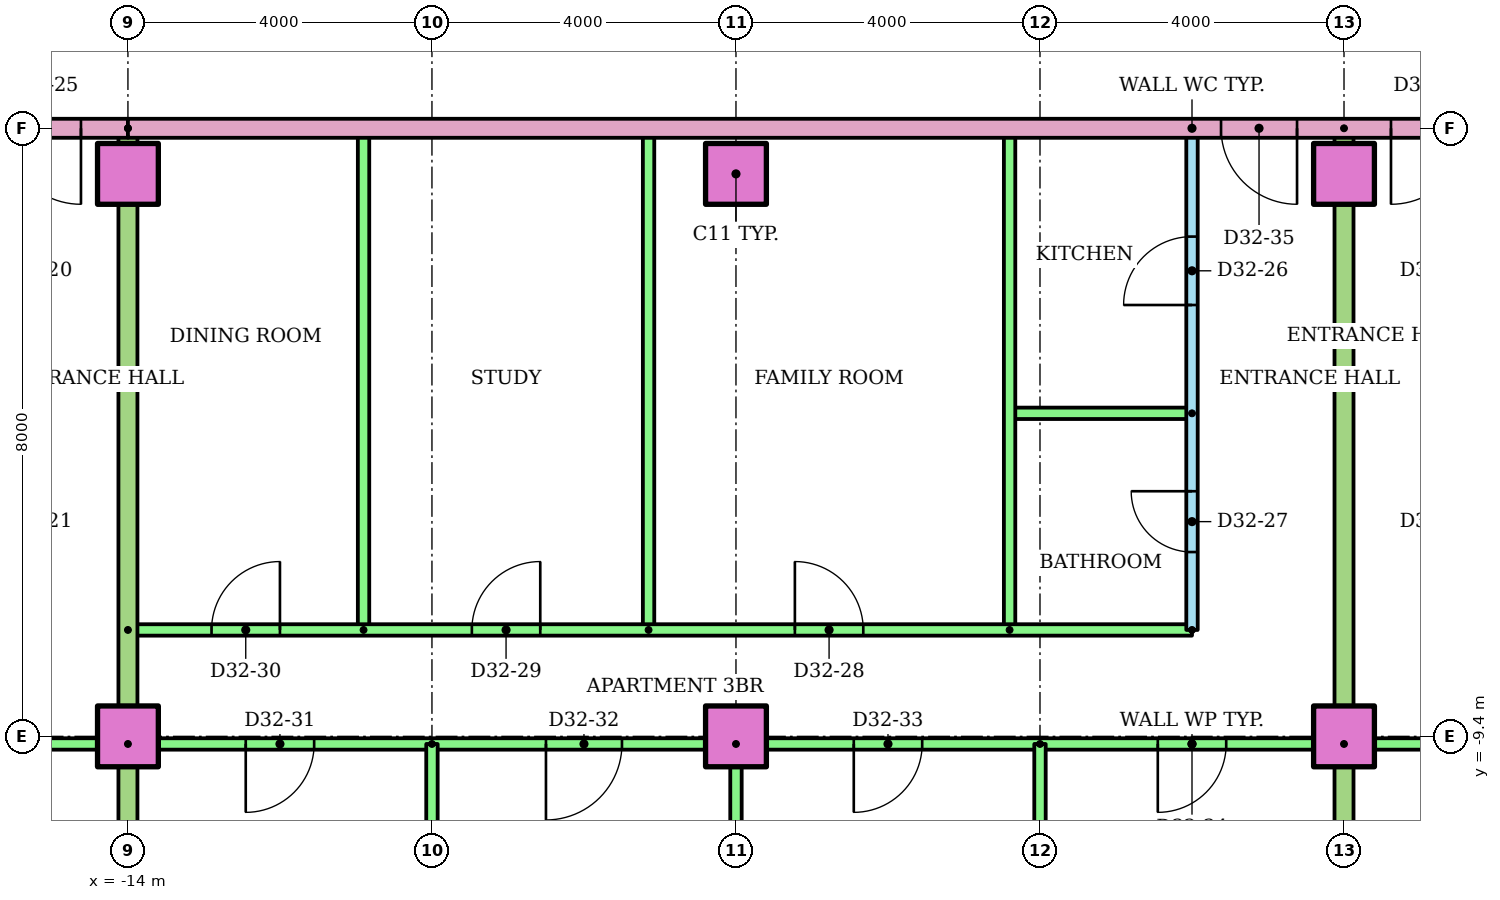
"""IFC4 building model, lengths in metres.
Left out: names, types, materials, properties, quantities, classifications, styles, units other than length and angle.
Written with IfcOpenShell. Run it as: python <this file> out.ifc"""

import sys

from ifc_helpers import new_model, si_unit, direction, frame, frame_2d, origin, origin_2d, place, context, subcontext, project, spatial, rectangle, extrude, element, fill, save


model = new_model("IFC4")
c1 = context("Model", 3, precision=1e-05, world=origin(), true_north=direction((0.0, 1.0)))
c2 = subcontext(c1, "Body", "Model", "MODEL_VIEW")
j1 = project(units=[si_unit("LENGTHUNIT", "METRE"), si_unit("PLANEANGLEUNIT", "RADIAN")], contexts=[c1])
p1 = place(None, origin())
s1 = spatial("IfcSite", under=j1, at=p1, CompositionType="ELEMENT")
p2 = place(p1, origin())
s2 = spatial("IfcBuilding", under=s1, at=p2, CompositionType="ELEMENT")
p3 = place(p2, frame((0.0, 0.0, 126.2)))
s3 = spatial("IfcBuildingStorey", under=s2, at=p3, CompositionType="ELEMENT", Elevation=126.2)
for number, where in (
    (1, (-14.0, -9.4, 0.0)),
    (2, (-6.0, -9.4, 0.0)),
    (3, (2.0, -9.4, 0.0)),
    (4, (-14.0, -2.0, 0.0)),
    (5, (-6.0, -2.0, 0.0)),
    (6, (2.0, -2.0, 0.0)),
):
    element("IfcColumn", number, at=place(p3, frame(where)), inside=s3, PredefinedType="COLUMN", context=c2, shape_type="SweptSolid", body=[
        extrude(rectangle(XDim=0.8, YDim=0.8, at=origin_2d()), origin(), (0.0, 0.0, 1.0), 3.2),
    ])
p4 = place(p3, frame((-14.0, -9.5, 0.0), z_axis=(0.0, 0.0, 1.0), x_axis=(-1.0, 0.0, 0.0)))
e7 = element("IfcWall", 7, at=p4, inside=s3, PredefinedType="PARTITIONING", context=c2, shape_type="SweptSolid", body=[
    extrude(rectangle(XDim=8.0, YDim=0.15, at=frame_2d((4.0, 0.0))), origin(), (0.0, 0.0, 1.0), 2.4),
])
p5 = place(p4, frame((5.5, 0.0, 0.0)))
e8 = element("IfcOpeningElement", 8, at=p5, cuts=e7, PredefinedType="OPENING", context=c2, shape_type="SweptSolid", body=[
    extrude(rectangle(XDim=1.0, YDim=2.1, at=frame_2d((0.5, 1.05))), frame((0.0, 0.085, 0.0), z_axis=(0.0, -1.0, 0.0), x_axis=(1.0, 0.0, 0.0)), (0.0, 0.0, 1.0), 0.17),
])
p6 = place(p4, frame((1.5, 0.0, 0.0)))
e9 = element("IfcOpeningElement", 9, at=p6, cuts=e7, PredefinedType="OPENING", context=c2, shape_type="SweptSolid", body=[
    extrude(rectangle(XDim=1.0, YDim=2.1, at=frame_2d((0.5, 1.05))), frame((0.0, 0.085, 0.0), z_axis=(0.0, -1.0, 0.0), x_axis=(1.0, 0.0, 0.0)), (0.0, 0.0, 1.0), 0.17),
])
p7 = place(p3, frame((0.0, -8.0, 0.0), z_axis=(0.0, 0.0, 1.0), x_axis=(0.0, 1.0, 0.0)))
e10 = element("IfcWall", 10, at=p7, inside=s3, PredefinedType="PARTITIONING", context=c2, shape_type="SweptSolid", body=[
    extrude(rectangle(XDim=6.6, YDim=0.15, at=frame_2d((3.3, 0.0))), origin(), (0.0, 0.0, 1.0), 2.4),
])
p8 = place(p7, frame((4.275, 0.0, 0.0)))
e11 = element("IfcOpeningElement", 11, at=p8, cuts=e10, PredefinedType="OPENING", context=c2, shape_type="SweptSolid", body=[
    extrude(rectangle(XDim=0.9, YDim=2.1, at=frame_2d((0.45, 1.05))), frame((0.0, 0.085, 0.0), z_axis=(0.0, -1.0, 0.0), x_axis=(1.0, 0.0, 0.0)), (0.0, 0.0, 1.0), 0.17),
])
p9 = place(p7, frame((1.025, 0.0, 0.0)))
e12 = element("IfcOpeningElement", 12, at=p9, cuts=e10, PredefinedType="OPENING", context=c2, shape_type="SweptSolid", body=[
    extrude(rectangle(XDim=0.8, YDim=2.1, at=frame_2d((0.4, 1.05))), frame((0.0, 0.085, 0.0), z_axis=(0.0, -1.0, 0.0), x_axis=(1.0, 0.0, 0.0)), (0.0, 0.0, 1.0), 0.17),
])
p10 = place(p3, frame((0.0, -5.15, 0.0), z_axis=(0.0, 0.0, 1.0), x_axis=(-1.0, 0.0, 0.0)))
e13 = element("IfcWall", 13, at=p10, inside=s3, PredefinedType="PARTITIONING", context=c2, shape_type="SweptSolid", body=[
    extrude(rectangle(XDim=2.4, YDim=0.15, at=frame_2d((1.2, 0.0))), origin(), (0.0, 0.0, 1.0), 2.4),
])
for number, where, z_axis, x_axis in (
    (14, (-2.4, -8.0, 0.0), (0.0, 0.0, 1.0), (0.0, 1.0, 0.0)),
    (15, (-7.15, -8.0, 0.0), (0.0, 0.0, 1.0), (0.0, 1.0, 0.0)),
    (16, (-10.9, -8.0, 0.0), (0.0, 0.0, 1.0), (0.0, 1.0, 0.0)),
):
    element("IfcWall", number, at=place(p3, frame(where, z_axis=z_axis, x_axis=x_axis)), inside=s3, PredefinedType="PARTITIONING", context=c2, shape_type="SweptSolid", body=[
        extrude(rectangle(XDim=6.6, YDim=0.15, at=frame_2d((3.3, 0.0))), origin(), (0.0, 0.0, 1.0), 2.4),
    ])
p11 = place(p3, frame((-14.0, -8.0, 0.0)))
e17 = element("IfcWall", 17, at=p11, inside=s3, PredefinedType="PARTITIONING", context=c2, shape_type="SweptSolid", body=[
    extrude(rectangle(XDim=14.0, YDim=0.15, at=frame_2d((7.0, 0.0))), origin(), (0.0, 0.0, 1.0), 2.4),
])
p12 = place(p11, frame((8.775, 0.0, 0.0)))
e18 = element("IfcOpeningElement", 18, at=p12, cuts=e17, PredefinedType="OPENING", context=c2, shape_type="SweptSolid", body=[
    extrude(rectangle(XDim=0.9, YDim=2.1, at=frame_2d((0.45, 1.05))), frame((0.0, 0.085, 0.0), z_axis=(0.0, -1.0, 0.0), x_axis=(1.0, 0.0, 0.0)), (0.0, 0.0, 1.0), 0.17),
])
p13 = place(p11, frame((4.525, 0.0, 0.0)))
e19 = element("IfcOpeningElement", 19, at=p13, cuts=e17, PredefinedType="OPENING", context=c2, shape_type="SweptSolid", body=[
    extrude(rectangle(XDim=0.9, YDim=2.1, at=frame_2d((0.45, 1.05))), frame((0.0, 0.085, 0.0), z_axis=(0.0, -1.0, 0.0), x_axis=(1.0, 0.0, 0.0)), (0.0, 0.0, 1.0), 0.17),
])
p14 = place(p11, frame((1.1, 0.0, 0.0)))
e20 = element("IfcOpeningElement", 20, at=p14, cuts=e17, PredefinedType="OPENING", context=c2, shape_type="SweptSolid", body=[
    extrude(rectangle(XDim=0.9, YDim=2.1, at=frame_2d((0.45, 1.05))), frame((0.0, 0.085, 0.0), z_axis=(0.0, -1.0, 0.0), x_axis=(1.0, 0.0, 0.0)), (0.0, 0.0, 1.0), 0.17),
])
p15 = place(p3, frame((2.0, -9.5, 0.0), z_axis=(0.0, 0.0, 1.0), x_axis=(-1.0, 0.0, 0.0)))
e21 = element("IfcWall", 21, at=p15, inside=s3, PredefinedType="PARTITIONING", context=c2, shape_type="SweptSolid", body=[
    extrude(rectangle(XDim=16.0, YDim=0.15, at=frame_2d((8.0, 0.0))), origin(), (0.0, 0.0, 1.0), 2.4),
])
p16 = place(p15, frame((13.55, 0.0, 0.0)))
e22 = element("IfcOpeningElement", 22, at=p16, cuts=e21, PredefinedType="OPENING", context=c2, shape_type="SweptSolid", body=[
    extrude(rectangle(XDim=0.9, YDim=2.1, at=frame_2d((0.45, 1.05))), frame((0.0, 0.085, 0.0), z_axis=(0.0, -1.0, 0.0), x_axis=(1.0, 0.0, 0.0)), (0.0, 0.0, 1.0), 0.17),
])
p17 = place(p15, frame((9.5, 0.0, 0.0)))
e23 = element("IfcOpeningElement", 23, at=p17, cuts=e21, PredefinedType="OPENING", context=c2, shape_type="SweptSolid", body=[
    extrude(rectangle(XDim=1.0, YDim=2.1, at=frame_2d((0.5, 1.05))), frame((0.0, 0.085, 0.0), z_axis=(0.0, -1.0, 0.0), x_axis=(1.0, 0.0, 0.0)), (0.0, 0.0, 1.0), 0.17),
])
p18 = place(p15, frame((5.55, 0.0, 0.0)))
e24 = element("IfcOpeningElement", 24, at=p18, cuts=e21, PredefinedType="OPENING", context=c2, shape_type="SweptSolid", body=[
    extrude(rectangle(XDim=0.9, YDim=2.1, at=frame_2d((0.45, 1.05))), frame((0.0, 0.085, 0.0), z_axis=(0.0, -1.0, 0.0), x_axis=(1.0, 0.0, 0.0)), (0.0, 0.0, 1.0), 0.17),
])
p19 = place(p15, frame((1.55, 0.0, 0.0)))
e25 = element("IfcOpeningElement", 25, at=p19, cuts=e21, PredefinedType="OPENING", context=c2, shape_type="SweptSolid", body=[
    extrude(rectangle(XDim=0.9, YDim=2.1, at=frame_2d((0.45, 1.05))), frame((0.0, 0.085, 0.0), z_axis=(0.0, -1.0, 0.0), x_axis=(1.0, 0.0, 0.0)), (0.0, 0.0, 1.0), 0.17),
])
p20 = place(p3, frame((-10.0, -9.5, 0.0), z_axis=(0.0, 0.0, 1.0), x_axis=(0.0, -1.0, 0.0)))
e26 = element("IfcWall", 26, at=p20, inside=s3, PredefinedType="PARTITIONING", context=c2, shape_type="SweptSolid", body=[
    extrude(rectangle(XDim=6.821, YDim=0.15, at=frame_2d((3.411, 0.0))), origin(), (0.0, 0.0, 1.0), 2.4),
])
p21 = place(p3, frame((-6.0, -9.5, 0.0), z_axis=(0.0, 0.0, 1.0), x_axis=(0.0, -1.0, 0.0)))
e27 = element("IfcWall", 27, at=p21, inside=s3, PredefinedType="PARTITIONING", context=c2, shape_type="SweptSolid", body=[
    extrude(rectangle(XDim=6.81, YDim=0.15, at=frame_2d((3.405, 0.0))), origin(), (0.0, 0.0, 1.0), 2.4),
])
p22 = place(p3, frame((-2.0, -9.5, 0.0), z_axis=(0.0, 0.0, 1.0), x_axis=(0.0, -1.0, 0.0)))
e28 = element("IfcWall", 28, at=p22, inside=s3, PredefinedType="PARTITIONING", context=c2, shape_type="SweptSolid", body=[
    extrude(rectangle(XDim=6.821, YDim=0.15, at=frame_2d((3.411, 0.0))), origin(), (0.0, 0.0, 1.0), 2.4),
])
p23 = place(p3, frame((-14.0, -1.4, 0.0), z_axis=(0.0, 0.0, 1.0), x_axis=(0.0, -1.0, 0.0)))
e29 = element("IfcWall", 29, at=p23, inside=s3, PredefinedType="PARTITIONING", context=c2, shape_type="SweptSolid", body=[
    extrude(rectangle(XDim=14.91, YDim=0.25, at=frame_2d((7.455, 0.0))), origin(), (0.0, 0.0, 1.0), 2.4),
])
p24 = place(p3, frame((18.0, -9.5, 0.0), z_axis=(0.0, 0.0, 1.0), x_axis=(-1.0, 0.0, 0.0)))
e30 = element("IfcWall", 30, at=p24, inside=s3, PredefinedType="PARTITIONING", context=c2, shape_type="SweptSolid", body=[
    extrude(rectangle(XDim=16.0, YDim=0.15, at=frame_2d((8.0, 0.0))), origin(), (0.0, 0.0, 1.0), 2.4),
])
p25 = place(p24, frame((13.55, 0.0, 0.0)))
e31 = element("IfcOpeningElement", 31, at=p25, cuts=e30, PredefinedType="OPENING", context=c2, shape_type="SweptSolid", body=[
    extrude(rectangle(XDim=0.9, YDim=2.1, at=frame_2d((0.45, 1.05))), frame((0.0, 0.085, 0.0), z_axis=(0.0, -1.0, 0.0), x_axis=(1.0, 0.0, 0.0)), (0.0, 0.0, 1.0), 0.17),
])
p26 = place(p24, frame((9.55, 0.0, 0.0)))
e32 = element("IfcOpeningElement", 32, at=p26, cuts=e30, PredefinedType="OPENING", context=c2, shape_type="SweptSolid", body=[
    extrude(rectangle(XDim=0.9, YDim=2.1, at=frame_2d((0.45, 1.05))), frame((0.0, 0.085, 0.0), z_axis=(0.0, -1.0, 0.0), x_axis=(1.0, 0.0, 0.0)), (0.0, 0.0, 1.0), 0.17),
])
p27 = place(p24, frame((5.55, 0.0, 0.0)))
e33 = element("IfcOpeningElement", 33, at=p27, cuts=e30, PredefinedType="OPENING", context=c2, shape_type="SweptSolid", body=[
    extrude(rectangle(XDim=0.9, YDim=2.1, at=frame_2d((0.45, 1.05))), frame((0.0, 0.085, 0.0), z_axis=(0.0, -1.0, 0.0), x_axis=(1.0, 0.0, 0.0)), (0.0, 0.0, 1.0), 0.17),
])
p28 = place(p24, frame((1.5, 0.0, 0.0)))
e34 = element("IfcOpeningElement", 34, at=p28, cuts=e30, PredefinedType="OPENING", context=c2, shape_type="SweptSolid", body=[
    extrude(rectangle(XDim=1.0, YDim=2.1, at=frame_2d((0.5, 1.05))), frame((0.0, 0.085, 0.0), z_axis=(0.0, -1.0, 0.0), x_axis=(1.0, 0.0, 0.0)), (0.0, 0.0, 1.0), 0.17),
])
p29 = place(p3, frame((2.0, -1.4, 0.0), z_axis=(0.0, 0.0, 1.0), x_axis=(0.0, -1.0, 0.0)))
e35 = element("IfcWall", 35, at=p29, inside=s3, PredefinedType="PARTITIONING", context=c2, shape_type="SweptSolid", body=[
    extrude(rectangle(XDim=14.91, YDim=0.25, at=frame_2d((7.455, 0.0))), origin(), (0.0, 0.0, 1.0), 2.4),
])
p30 = place(p3, frame((-14.0, -1.4, 0.0), z_axis=(0.0, 0.0, 1.0), x_axis=(-1.0, 0.0, 0.0)))
e36 = element("IfcWall", 36, at=p30, inside=s3, PredefinedType="PARTITIONING", context=c2, shape_type="SweptSolid", body=[
    extrude(rectangle(XDim=15.0, YDim=0.25, at=frame_2d((7.5, 0.0))), origin(), (0.0, 0.0, 1.0), 2.4),
])
p31 = place(p30, frame((8.618, 0.0, 0.0)))
e37 = element("IfcOpeningElement", 37, at=p31, cuts=e36, PredefinedType="OPENING", context=c2, shape_type="SweptSolid", body=[
    extrude(rectangle(XDim=1.0, YDim=2.1, at=frame_2d((0.5, 1.05))), frame((0.0, 0.135, 0.0), z_axis=(0.0, -1.0, 0.0), x_axis=(1.0, 0.0, 0.0)), (0.0, 0.0, 1.0), 0.27),
])
p32 = place(p30, frame((0.618, 0.0, 0.0)))
e38 = element("IfcOpeningElement", 38, at=p32, cuts=e36, PredefinedType="OPENING", context=c2, shape_type="SweptSolid", body=[
    extrude(rectangle(XDim=1.0, YDim=2.1, at=frame_2d((0.5, 1.05))), frame((0.0, 0.135, 0.0), z_axis=(0.0, -1.0, 0.0), x_axis=(1.0, 0.0, 0.0)), (0.0, 0.0, 1.0), 0.27),
])
p33 = place(p3, frame((14.0, -1.4, 0.0), z_axis=(0.0, 0.0, 1.0), x_axis=(-1.0, 0.0, 0.0)))
e39 = element("IfcWall", 39, at=p33, inside=s3, PredefinedType="PARTITIONING", context=c2, shape_type="SweptSolid", body=[
    extrude(rectangle(XDim=28.0, YDim=0.25, at=frame_2d((14.0, 0.0))), origin(), (0.0, 0.0, 1.0), 2.4),
])
p34 = place(p33, frame((12.618, 0.0, 0.0)))
e40 = element("IfcOpeningElement", 40, at=p34, cuts=e39, PredefinedType="OPENING", context=c2, shape_type="SweptSolid", body=[
    extrude(rectangle(XDim=1.0, YDim=2.1, at=frame_2d((0.5, 1.05))), frame((0.0, 0.135, 0.0), z_axis=(0.0, -1.0, 0.0), x_axis=(1.0, 0.0, 0.0)), (0.0, 0.0, 1.0), 0.27),
])
p35 = place(p33, frame((10.382, 0.0, 0.0)))
e41 = element("IfcOpeningElement", 41, at=p35, cuts=e39, PredefinedType="OPENING", context=c2, shape_type="SweptSolid", body=[
    extrude(rectangle(XDim=1.0, YDim=2.1, at=frame_2d((0.5, 1.05))), frame((0.0, 0.135, 0.0), z_axis=(0.0, -1.0, 0.0), x_axis=(1.0, 0.0, 0.0)), (0.0, 0.0, 1.0), 0.27),
])
p36 = place(p32, origin())
e42 = element("IfcDoor", 42, at=p36, inside=s3, OperationType="SINGLE_SWING_LEFT", PredefinedType="DOOR", context=c2, shape_type="SweptSolid", body=[
    extrude(rectangle(XDim=1.0, YDim=2.1, at=frame_2d((0.5, 1.05))), frame((0.0, 0.025, 0.0), z_axis=(0.0, -1.0, 0.0), x_axis=(1.0, 0.0, 0.0)), (0.0, 0.0, 1.0), 0.05),
])
fill(e38, e42)
p37 = place(p8, origin())
e43 = element("IfcDoor", 43, at=p37, inside=s3, OperationType="SINGLE_SWING_LEFT", PredefinedType="DOOR", context=c2, shape_type="SweptSolid", body=[
    extrude(rectangle(XDim=0.9, YDim=2.1, at=frame_2d((0.45, 1.05))), frame((0.0, 0.025, 0.0), z_axis=(0.0, -1.0, 0.0), x_axis=(1.0, 0.0, 0.0)), (0.0, 0.0, 1.0), 0.05),
])
fill(e11, e43)
p38 = place(p9, origin())
e44 = element("IfcDoor", 44, at=p38, inside=s3, OperationType="SINGLE_SWING_RIGHT", PredefinedType="DOOR", context=c2, shape_type="SweptSolid", body=[
    extrude(rectangle(XDim=0.8, YDim=2.1, at=frame_2d((0.4, 1.05))), frame((0.0, 0.025, 0.0), z_axis=(0.0, -1.0, 0.0), x_axis=(1.0, 0.0, 0.0)), (0.0, 0.0, 1.0), 0.05),
])
fill(e12, e44)
p39 = place(p12, origin())
e45 = element("IfcDoor", 45, at=p39, inside=s3, OperationType="SINGLE_SWING_LEFT", PredefinedType="DOOR", context=c2, shape_type="SweptSolid", body=[
    extrude(rectangle(XDim=0.9, YDim=2.1, at=frame_2d((0.45, 1.05))), frame((0.0, 0.025, 0.0), z_axis=(0.0, -1.0, 0.0), x_axis=(1.0, 0.0, 0.0)), (0.0, 0.0, 1.0), 0.05),
])
fill(e18, e45)
p40 = place(p13, origin())
e46 = element("IfcDoor", 46, at=p40, inside=s3, OperationType="SINGLE_SWING_RIGHT", PredefinedType="DOOR", context=c2, shape_type="SweptSolid", body=[
    extrude(rectangle(XDim=0.9, YDim=2.1, at=frame_2d((0.45, 1.05))), frame((0.0, 0.025, 0.0), z_axis=(0.0, -1.0, 0.0), x_axis=(1.0, 0.0, 0.0)), (0.0, 0.0, 1.0), 0.05),
])
fill(e19, e46)
p41 = place(p14, origin())
e47 = element("IfcDoor", 47, at=p41, inside=s3, OperationType="SINGLE_SWING_RIGHT", PredefinedType="DOOR", context=c2, shape_type="SweptSolid", body=[
    extrude(rectangle(XDim=0.9, YDim=2.1, at=frame_2d((0.45, 1.05))), frame((0.0, 0.025, 0.0), z_axis=(0.0, -1.0, 0.0), x_axis=(1.0, 0.0, 0.0)), (0.0, 0.0, 1.0), 0.05),
])
fill(e20, e47)
p42 = place(p16, origin())
e48 = element("IfcDoor", 48, at=p42, inside=s3, OperationType="SINGLE_SWING_RIGHT", PredefinedType="DOOR", context=c2, shape_type="SweptSolid", body=[
    extrude(rectangle(XDim=0.9, YDim=2.1, at=frame_2d((0.45, 1.05))), frame((0.0, 0.025, 0.0), z_axis=(0.0, -1.0, 0.0), x_axis=(1.0, 0.0, 0.0)), (0.0, 0.0, 1.0), 0.05),
])
fill(e22, e48)
p43 = place(p17, origin())
e49 = element("IfcDoor", 49, at=p43, inside=s3, OperationType="SINGLE_SWING_RIGHT", PredefinedType="DOOR", context=c2, shape_type="SweptSolid", body=[
    extrude(rectangle(XDim=1.0, YDim=2.1, at=frame_2d((0.5, 1.05))), frame((0.0, 0.025, 0.0), z_axis=(0.0, -1.0, 0.0), x_axis=(1.0, 0.0, 0.0)), (0.0, 0.0, 1.0), 0.05),
])
fill(e23, e49)
p44 = place(p18, origin())
e50 = element("IfcDoor", 50, at=p44, inside=s3, OperationType="SINGLE_SWING_RIGHT", PredefinedType="DOOR", context=c2, shape_type="SweptSolid", body=[
    extrude(rectangle(XDim=0.9, YDim=2.1, at=frame_2d((0.45, 1.05))), frame((0.0, 0.025, 0.0), z_axis=(0.0, -1.0, 0.0), x_axis=(1.0, 0.0, 0.0)), (0.0, 0.0, 1.0), 0.05),
])
fill(e24, e50)
p45 = place(p19, origin())
e51 = element("IfcDoor", 51, at=p45, inside=s3, OperationType="SINGLE_SWING_RIGHT", PredefinedType="DOOR", context=c2, shape_type="SweptSolid", body=[
    extrude(rectangle(XDim=0.9, YDim=2.1, at=frame_2d((0.45, 1.05))), frame((0.0, 0.025, 0.0), z_axis=(0.0, -1.0, 0.0), x_axis=(1.0, 0.0, 0.0)), (0.0, 0.0, 1.0), 0.05),
])
fill(e25, e51)
p46 = place(p34, origin())
e52 = element("IfcDoor", 52, at=p46, inside=s3, OperationType="SINGLE_SWING_LEFT", PredefinedType="DOOR", context=c2, shape_type="SweptSolid", body=[
    extrude(rectangle(XDim=1.0, YDim=2.1, at=frame_2d((0.5, 1.05))), frame((0.0, 0.025, 0.0), z_axis=(0.0, -1.0, 0.0), x_axis=(1.0, 0.0, 0.0)), (0.0, 0.0, 1.0), 0.05),
])
fill(e40, e52)
p47 = place(p35, origin())
e53 = element("IfcDoor", 53, at=p47, inside=s3, OperationType="SINGLE_SWING_RIGHT", PredefinedType="DOOR", context=c2, shape_type="SweptSolid", body=[
    extrude(rectangle(XDim=1.0, YDim=2.1, at=frame_2d((0.5, 1.05))), frame((0.0, 0.025, 0.0), z_axis=(0.0, -1.0, 0.0), x_axis=(1.0, 0.0, 0.0)), (0.0, 0.0, 1.0), 0.05),
])
fill(e41, e53)
save(model, sys.argv[1])
